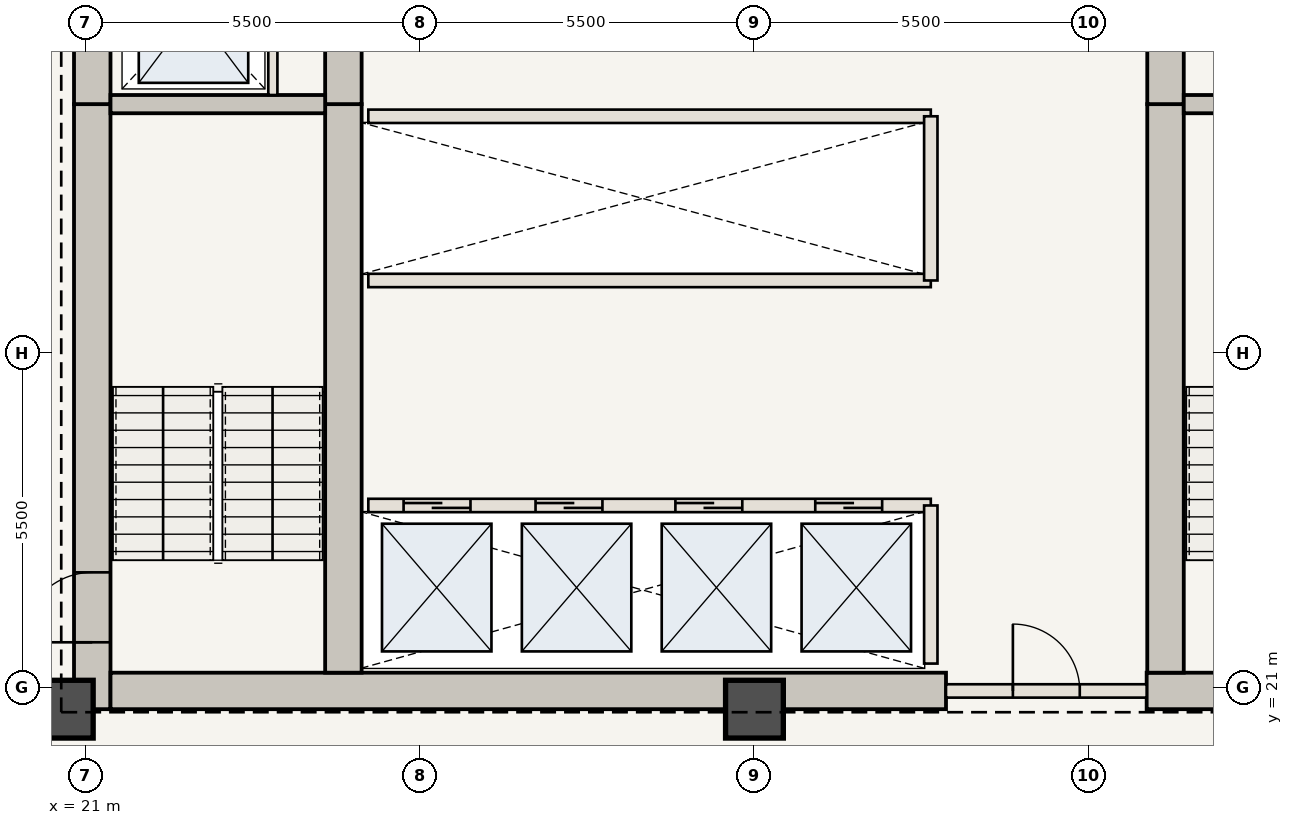
"""IFC4 building model, lengths in metres.
Left out: names, types, materials, properties, quantities, classifications, styles, units other than length and angle.
Written with IfcOpenShell. Run it as: python <this file> out.ifc"""

import sys

from ifc_helpers import new_model, si_unit, direction, frame, frame_2d, origin, origin_2d, place, context, subcontext, project, spatial, rectangle, extrude, element, fill, save


model = new_model("IFC4")
c1 = context("Model", 3, precision=1e-05, world=origin(), true_north=direction((0.0, 1.0)))
c2 = subcontext(c1, "Body", "Model", "MODEL_VIEW")
j1 = project(units=[si_unit("LENGTHUNIT", "METRE"), si_unit("PLANEANGLEUNIT", "RADIAN")], contexts=[c1])
p1 = place(None, origin())
s1 = spatial("IfcSite", under=j1, at=p1, CompositionType="ELEMENT")
p2 = place(p1, origin())
s2 = spatial("IfcBuilding", under=s1, at=p2, CompositionType="ELEMENT")
p3 = place(p2, frame((0.0, 0.0, 110.6)))
s3 = spatial("IfcBuildingStorey", under=s2, at=p3, CompositionType="ELEMENT", Elevation=110.6)
p4 = place(p3, frame((21.11, 20.65, 0.0), z_axis=(0.0, 0.0, 1.0), x_axis=(0.0, 1.0, 0.0)))
e1 = element("IfcWall", 1, at=p4, inside=s3, PredefinedType="SHEAR", context=c2, shape_type="SweptSolid", body=[
    extrude(rectangle(XDim=9.95, YDim=0.6, at=frame_2d((4.975, 0.0))), origin(), (0.0, 0.0, 1.0), 3.85),
])
p5 = place(p4, frame((1.1, 0.0, 0.0)))
e2 = element("IfcOpeningElement", 2, at=p5, cuts=e1, PredefinedType="OPENING", context=c2, shape_type="SweptSolid", body=[
    extrude(rectangle(XDim=1.15, YDim=2.15, at=frame_2d((0.575, 1.075))), frame((0.0, 0.31, 0.0), z_axis=(0.0, -1.0, 0.0), x_axis=(1.0, 0.0, 0.0)), (0.0, 0.0, 1.0), 0.62),
])
p6 = place(p3, frame((21.11, 30.6, 0.0), z_axis=(0.0, 0.0, 1.0), x_axis=(0.0, 1.0, 0.0)))
e3 = element("IfcWall", 3, at=p6, inside=s3, PredefinedType="SHEAR", context=c2, shape_type="SweptSolid", body=[
    extrude(rectangle(XDim=12.7, YDim=0.6, at=frame_2d((6.35, 0.0))), origin(), (0.0, 0.0, 1.0), 3.85),
])
p7 = place(p6, frame((4.2, 0.0, 0.0)))
e4 = element("IfcOpeningElement", 4, at=p7, cuts=e3, PredefinedType="OPENING", context=c2, shape_type="SweptSolid", body=[
    extrude(rectangle(XDim=1.1, YDim=2.15, at=frame_2d((0.55, 1.075))), frame((0.0, 0.31, 0.0), z_axis=(0.0, -1.0, 0.0), x_axis=(1.0, 0.0, 0.0)), (0.0, 0.0, 1.0), 0.62),
])
p8 = place(p6, frame((9.2, 0.0, 0.0)))
e5 = element("IfcOpeningElement", 5, at=p8, cuts=e3, PredefinedType="OPENING", context=c2, shape_type="SweptSolid", body=[
    extrude(rectangle(XDim=0.92, YDim=2.1, at=frame_2d((0.46, 1.05))), frame((0.0, 0.31, 0.0), z_axis=(0.0, -1.0, 0.0), x_axis=(1.0, 0.0, 0.0)), (0.0, 0.0, 1.0), 0.62),
])
p9 = place(p3, frame((21.41, 20.95, 0.0), z_axis=(0.0, 0.0, 1.0), x_axis=(1.0, 0.0, 0.0)))
e6 = element("IfcWall", 6, at=p9, inside=s3, PredefinedType="SHEAR", context=c2, shape_type="SweptSolid", body=[
    extrude(rectangle(XDim=13.74, YDim=0.6, at=frame_2d((6.87, 0.0))), origin(), (0.0, 0.0, 1.0), 3.85),
])
p10 = place(p3, frame((38.45, 20.95, 0.0), z_axis=(0.0, 0.0, 1.0), x_axis=(1.0, 0.0, 0.0)))
e7 = element("IfcWall", 7, at=p10, inside=s3, PredefinedType="SHEAR", context=c2, shape_type="SweptSolid", body=[
    extrude(rectangle(XDim=4.14, YDim=0.6, at=frame_2d((2.07, 0.0))), origin(), (0.0, 0.0, 1.0), 3.85),
])
p11 = place(p3, frame((25.24, 21.25, 0.0), z_axis=(0.0, 0.0, 1.0), x_axis=(0.0, 1.0, 0.0)))
e8 = element("IfcWall", 8, at=p11, inside=s3, PredefinedType="SHEAR", context=c2, shape_type="SweptSolid", body=[
    extrude(rectangle(XDim=9.35, YDim=0.6, at=frame_2d((4.675, 0.0))), origin(), (0.0, 0.0, 1.0), 3.85),
])
p12 = place(p3, frame((25.24, 30.6, 0.0), z_axis=(0.0, 0.0, 1.0), x_axis=(0.0, 1.0, 0.0)))
e9 = element("IfcWall", 9, at=p12, inside=s3, PredefinedType="SHEAR", context=c2, shape_type="SweptSolid", body=[
    extrude(rectangle(XDim=12.1, YDim=0.6, at=frame_2d((6.05, 0.0))), origin(), (0.0, 0.0, 1.0), 3.85),
])
p13 = place(p12, frame((6.25, 0.0, 0.0)))
e10 = element("IfcOpeningElement", 10, at=p13, cuts=e9, PredefinedType="OPENING", context=c2, shape_type="SweptSolid", body=[
    extrude(rectangle(XDim=1.1, YDim=2.15, at=frame_2d((0.55, 1.075))), frame((0.0, 0.31, 0.0), z_axis=(0.0, -1.0, 0.0), x_axis=(1.0, 0.0, 0.0)), (0.0, 0.0, 1.0), 0.62),
])
p14 = place(p3, frame((38.76, 21.25, 0.0), z_axis=(0.0, 0.0, 1.0), x_axis=(0.0, 1.0, 0.0)))
e11 = element("IfcWall", 11, at=p14, inside=s3, PredefinedType="SHEAR", context=c2, shape_type="SweptSolid", body=[
    extrude(rectangle(XDim=9.35, YDim=0.6, at=frame_2d((4.675, 0.0))), origin(), (0.0, 0.0, 1.0), 3.85),
])
p15 = place(p3, frame((38.76, 30.6, 0.0), z_axis=(0.0, 0.0, 1.0), x_axis=(0.0, 1.0, 0.0)))
e12 = element("IfcWall", 12, at=p15, inside=s3, PredefinedType="SHEAR", context=c2, shape_type="SweptSolid", body=[
    extrude(rectangle(XDim=12.1, YDim=0.6, at=frame_2d((6.05, 0.0))), origin(), (0.0, 0.0, 1.0), 3.85),
])
for number, where, z_axis, x_axis in (
    (13, (20.65, 20.65, 0.0), (0.0, 0.0, 1.0), (1.0, 0.0, 0.0)),
    (14, (32.0, 20.65, 0.0), (0.0, 0.0, 1.0), (1.0, 0.0, 0.0)),
):
    element("IfcColumn", number, at=place(p3, frame(where, z_axis=z_axis, x_axis=x_axis)), inside=s3, PredefinedType="COLUMN", context=c2, shape_type="SweptSolid", body=[
        extrude(rectangle(XDim=0.95, YDim=0.95, at=origin_2d()), origin(), (0.0, 0.0, 1.0), 3.85),
    ])
for number, where, z_axis, x_axis in (
    (15, (21.41, 30.6, 0.0), (0.0, 0.0, 1.0), (1.0, 0.0, 0.0)),
    (16, (39.06, 30.6, 0.0), (0.0, 0.0, 1.0), (1.0, 0.0, 0.0)),
):
    element("IfcWall", number, at=place(p3, frame(where, z_axis=z_axis, x_axis=x_axis)), inside=s3, PredefinedType="SHEAR", context=c2, shape_type="SweptSolid", body=[
        extrude(rectangle(XDim=3.53, YDim=0.3, at=frame_2d((1.765, 0.0))), origin(), (0.0, 0.0, 1.0), 3.43),
    ])
p16 = place(p3, frame((24.08, 30.75, 0.0), z_axis=(0.0, 0.0, 1.0), x_axis=(0.0, 1.0, 0.0)))
e17 = element("IfcWall", 17, at=p16, inside=s3, PredefinedType="STANDARD", context=c2, shape_type="SweptSolid", body=[
    extrude(rectangle(XDim=2.65, YDim=0.15, at=frame_2d((1.325, 0.0))), origin(), (0.0, 0.0, 1.0), 3.43),
])
p17 = place(p3, frame((35.15, 20.95, 0.0), z_axis=(0.0, 0.0, 1.0), x_axis=(1.0, 0.0, 0.0)))
e18 = element("IfcWall", 18, at=p17, inside=s3, PredefinedType="STANDARD", context=c2, shape_type="SweptSolid", body=[
    extrude(rectangle(XDim=3.3, YDim=0.22, at=frame_2d((1.65, 0.0))), origin(), (0.0, 0.0, 1.0), 3.43),
])
p18 = place(p17, frame((1.1, 0.0, 0.0)))
e19 = element("IfcOpeningElement", 19, at=p18, cuts=e18, PredefinedType="OPENING", context=c2, shape_type="SweptSolid", body=[
    extrude(rectangle(XDim=1.1, YDim=2.15, at=frame_2d((0.55, 1.075))), frame((0.0, 0.12, 0.0), z_axis=(0.0, -1.0, 0.0), x_axis=(1.0, 0.0, 0.0)), (0.0, 0.0, 1.0), 0.24),
])
p19 = place(p3, frame((25.65, 24.0, 0.0), z_axis=(0.0, 0.0, 1.0), x_axis=(1.0, 0.0, 0.0)))
e20 = element("IfcWall", 20, at=p19, inside=s3, PredefinedType="STANDARD", context=c2, shape_type="SweptSolid", body=[
    extrude(rectangle(XDim=9.25, YDim=0.22, at=frame_2d((4.625, 0.0))), origin(), (0.0, 0.0, 1.0), 3.43),
])
p20 = place(p19, frame((0.58, 0.0, 0.0)))
e21 = element("IfcOpeningElement", 21, at=p20, cuts=e20, PredefinedType="OPENING", context=c2, shape_type="SweptSolid", body=[
    extrude(rectangle(XDim=1.1, YDim=2.15, at=frame_2d((0.55, 1.075))), frame((0.0, 0.12, 0.0), z_axis=(0.0, -1.0, 0.0), x_axis=(1.0, 0.0, 0.0)), (0.0, 0.0, 1.0), 0.24),
])
p21 = place(p19, frame((2.75, 0.0, 0.0)))
e22 = element("IfcOpeningElement", 22, at=p21, cuts=e20, PredefinedType="OPENING", context=c2, shape_type="SweptSolid", body=[
    extrude(rectangle(XDim=1.1, YDim=2.15, at=frame_2d((0.55, 1.075))), frame((0.0, 0.12, 0.0), z_axis=(0.0, -1.0, 0.0), x_axis=(1.0, 0.0, 0.0)), (0.0, 0.0, 1.0), 0.24),
])
p22 = place(p19, frame((5.05, 0.0, 0.0)))
e23 = element("IfcOpeningElement", 23, at=p22, cuts=e20, PredefinedType="OPENING", context=c2, shape_type="SweptSolid", body=[
    extrude(rectangle(XDim=1.1, YDim=2.15, at=frame_2d((0.55, 1.075))), frame((0.0, 0.12, 0.0), z_axis=(0.0, -1.0, 0.0), x_axis=(1.0, 0.0, 0.0)), (0.0, 0.0, 1.0), 0.24),
])
p23 = place(p19, frame((7.35, 0.0, 0.0)))
e24 = element("IfcOpeningElement", 24, at=p23, cuts=e20, PredefinedType="OPENING", context=c2, shape_type="SweptSolid", body=[
    extrude(rectangle(XDim=1.1, YDim=2.15, at=frame_2d((0.55, 1.075))), frame((0.0, 0.12, 0.0), z_axis=(0.0, -1.0, 0.0), x_axis=(1.0, 0.0, 0.0)), (0.0, 0.0, 1.0), 0.24),
])
p24 = place(p3, frame((34.9, 21.4, 0.0), z_axis=(0.0, 0.0, 1.0), x_axis=(0.0, 1.0, 0.0)))
e25 = element("IfcWall", 25, at=p24, inside=s3, PredefinedType="STANDARD", context=c2, shape_type="SweptSolid", body=[
    extrude(rectangle(XDim=2.6, YDim=0.22, at=frame_2d((1.3, 0.0))), origin(), (0.0, 0.0, 1.0), 3.43),
])
for number, where, z_axis, x_axis in (
    (26, (25.65, 27.7, 0.0), (0.0, 0.0, 1.0), (1.0, 0.0, 0.0)),
    (27, (25.65, 30.4, 0.0), (0.0, 0.0, 1.0), (1.0, 0.0, 0.0)),
):
    element("IfcWall", number, at=place(p3, frame(where, z_axis=z_axis, x_axis=x_axis)), inside=s3, PredefinedType="STANDARD", context=c2, shape_type="SweptSolid", body=[
        extrude(rectangle(XDim=9.25, YDim=0.22, at=frame_2d((4.625, 0.0))), origin(), (0.0, 0.0, 1.0), 3.43),
    ])
p25 = place(p3, frame((34.9, 27.7, 0.0), z_axis=(0.0, 0.0, 1.0), x_axis=(0.0, 1.0, 0.0)))
e28 = element("IfcWall", 28, at=p25, inside=s3, PredefinedType="STANDARD", context=c2, shape_type="SweptSolid", body=[
    extrude(rectangle(XDim=2.7, YDim=0.22, at=frame_2d((1.35, 0.0))), origin(), (0.0, 0.0, 1.0), 3.43),
])
p26 = place(p5, origin())
e29 = element("IfcDoor", 29, at=p26, inside=s3, OperationType="SINGLE_SWING_LEFT", PredefinedType="DOOR", context=c2, shape_type="SweptSolid", body=[
    extrude(rectangle(XDim=1.15, YDim=2.15, at=frame_2d((0.575, 1.075))), frame((0.0, 0.025, 0.0), z_axis=(0.0, -1.0, 0.0), x_axis=(1.0, 0.0, 0.0)), (0.0, 0.0, 1.0), 0.05),
])
fill(e2, e29)
p27 = place(p18, origin())
e30 = element("IfcDoor", 30, at=p27, inside=s3, OperationType="SINGLE_SWING_LEFT", PredefinedType="DOOR", context=c2, shape_type="SweptSolid", body=[
    extrude(rectangle(XDim=1.1, YDim=2.15, at=frame_2d((0.55, 1.075))), frame((0.0, 0.025, 0.0), z_axis=(0.0, -1.0, 0.0), x_axis=(1.0, 0.0, 0.0)), (0.0, 0.0, 1.0), 0.05),
])
fill(e19, e30)
p28 = place(p20, origin())
e31 = element("IfcDoor", 31, at=p28, inside=s3, OperationType="DOUBLE_DOOR_SLIDING", PredefinedType="DOOR", context=c2, shape_type="SweptSolid", body=[
    extrude(rectangle(XDim=1.1, YDim=2.15, at=frame_2d((0.55, 1.075))), frame((0.0, 0.025, 0.0), z_axis=(0.0, -1.0, 0.0), x_axis=(1.0, 0.0, 0.0)), (0.0, 0.0, 1.0), 0.05),
])
fill(e21, e31)
p29 = place(p21, origin())
e32 = element("IfcDoor", 32, at=p29, inside=s3, OperationType="DOUBLE_DOOR_SLIDING", PredefinedType="DOOR", context=c2, shape_type="SweptSolid", body=[
    extrude(rectangle(XDim=1.1, YDim=2.15, at=frame_2d((0.55, 1.075))), frame((0.0, 0.025, 0.0), z_axis=(0.0, -1.0, 0.0), x_axis=(1.0, 0.0, 0.0)), (0.0, 0.0, 1.0), 0.05),
])
fill(e22, e32)
p30 = place(p22, origin())
e33 = element("IfcDoor", 33, at=p30, inside=s3, OperationType="DOUBLE_DOOR_SLIDING", PredefinedType="DOOR", context=c2, shape_type="SweptSolid", body=[
    extrude(rectangle(XDim=1.1, YDim=2.15, at=frame_2d((0.55, 1.075))), frame((0.0, 0.025, 0.0), z_axis=(0.0, -1.0, 0.0), x_axis=(1.0, 0.0, 0.0)), (0.0, 0.0, 1.0), 0.05),
])
fill(e23, e33)
p31 = place(p23, origin())
e34 = element("IfcDoor", 34, at=p31, inside=s3, OperationType="DOUBLE_DOOR_SLIDING", PredefinedType="DOOR", context=c2, shape_type="SweptSolid", body=[
    extrude(rectangle(XDim=1.1, YDim=2.15, at=frame_2d((0.55, 1.075))), frame((0.0, 0.025, 0.0), z_axis=(0.0, -1.0, 0.0), x_axis=(1.0, 0.0, 0.0)), (0.0, 0.0, 1.0), 0.05),
])
fill(e24, e34)
save(model, sys.argv[1])
